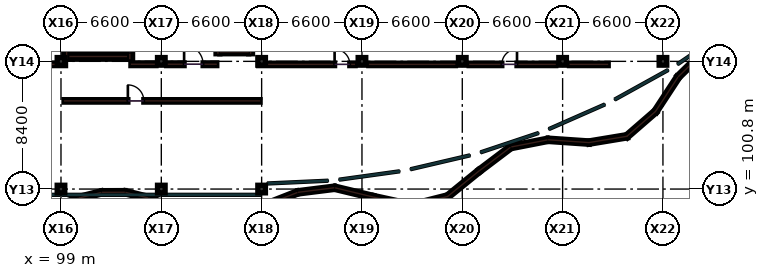
"""IFC4 building model, lengths in metres.
Left out: names, types, materials, properties, quantities, classifications, styles, units other than length and angle.
Written with IfcOpenShell. Run it as: python <this file> out.ifc"""

import sys

from ifc_helpers import new_model, si_unit, direction, frame, frame_2d, origin, origin_2d, place, context, subcontext, project, spatial, rectangle, extrude, element, fill, save


model = new_model("IFC4")
c1 = context("Model", 3, precision=1e-05, world=origin(), true_north=direction((0.0, 1.0)))
c2 = subcontext(c1, "Body", "Model", "MODEL_VIEW")
j1 = project(units=[si_unit("LENGTHUNIT", "METRE"), si_unit("PLANEANGLEUNIT", "RADIAN")], contexts=[c1])
p1 = place(None, origin())
s1 = spatial("IfcSite", under=j1, at=p1, CompositionType="ELEMENT")
p2 = place(p1, origin())
s2 = spatial("IfcBuilding", under=s1, at=p2, CompositionType="ELEMENT")
p3 = place(p2, frame((0.0, 0.0, 18.6)))
s3 = spatial("IfcBuildingStorey", under=s2, at=p3, CompositionType="ELEMENT", Elevation=18.6)
for number, where, z_axis, x_axis in (
    (1, (99.0, 100.8, 0.0), (0.0, 0.0, 1.0), (1.0, 0.0, 0.0)),
    (2, (99.0, 109.2, 0.0), (0.0, 0.0, 1.0), (1.0, 0.0, 0.0)),
    (3, (105.6, 100.8, 0.0), (0.0, 0.0, 1.0), (1.0, 0.0, 0.0)),
    (4, (105.6, 109.2, 0.0), (0.0, 0.0, 1.0), (1.0, 0.0, 0.0)),
    (5, (112.2, 100.8, 0.0), (0.0, 0.0, 1.0), (1.0, 0.0, 0.0)),
    (6, (112.2, 109.2, 0.0), (0.0, 0.0, 1.0), (1.0, 0.0, 0.0)),
    (7, (118.8, 109.2, 0.0), (0.0, 0.0, 1.0), (1.0, 0.0, 0.0)),
    (8, (125.4, 109.2, 0.0), (0.0, 0.0, 1.0), (1.0, 0.0, 0.0)),
    (9, (132.0, 109.2, 0.0), (0.0, 0.0, 1.0), (1.0, 0.0, 0.0)),
    (10, (138.6, 109.2, 0.0), (0.0, 0.0, 1.0), (1.0, 0.0, 0.0)),
):
    element("IfcColumn", number, at=place(p3, frame(where, z_axis=z_axis, x_axis=x_axis)), inside=s3, PredefinedType="COLUMN", context=c2, shape_type="SweptSolid", body=[
        extrude(rectangle(XDim=0.5, YDim=0.5, at=origin_2d()), origin(), (0.0, 0.0, 1.0), 4.2),
    ])
p4 = place(p3, frame((92.85, 109.0, 0.0), z_axis=(0.0, 0.0, 1.0), x_axis=(1.0, 0.0, 0.0)))
e11 = element("IfcWall", 11, at=p4, inside=s3, PredefinedType="PARTITIONING", context=c2, shape_type="SweptSolid", body=[
    extrude(rectangle(XDim=6.45, YDim=0.16, at=frame_2d((3.225, 0.0))), origin(), (0.0, 0.0, 1.0), 3.175),
])
p5 = place(p3, frame((112.0, 109.0, 0.0), z_axis=(0.0, 0.0, 1.0), x_axis=(1.0, 0.0, 0.0)))
e12 = element("IfcWall", 12, at=p5, inside=s3, PredefinedType="PARTITIONING", context=c2, shape_type="SweptSolid", body=[
    extrude(rectangle(XDim=6.35, YDim=0.16, at=frame_2d((3.175, 0.0))), origin(), (0.0, 0.0, 1.0), 3.175),
])
p6 = place(p5, frame((5.0, 0.0, 0.0)))
e13 = element("IfcOpeningElement", 13, at=p6, cuts=e12, PredefinedType="OPENING", context=c2, shape_type="SweptSolid", body=[
    extrude(rectangle(XDim=1.0, YDim=2.2, at=frame_2d((0.5, 1.1))), frame((0.0, 0.09, 0.0), z_axis=(0.0, -1.0, 0.0), x_axis=(1.0, 0.0, 0.0)), (0.0, 0.0, 1.0), 0.18),
])
p7 = place(p3, frame((119.25, 109.0, 0.0), z_axis=(0.0, 0.0, 1.0), x_axis=(1.0, 0.0, 0.0)))
e14 = element("IfcWall", 14, at=p7, inside=s3, PredefinedType="PARTITIONING", context=c2, shape_type="SweptSolid", body=[
    extrude(rectangle(XDim=5.7, YDim=0.16, at=frame_2d((2.85, 0.0))), origin(), (0.0, 0.0, 1.0), 3.175),
])
p8 = place(p3, frame((125.85, 109.0, 0.0), z_axis=(0.0, 0.0, 1.0), x_axis=(1.0, 0.0, 0.0)))
e15 = element("IfcWall", 15, at=p8, inside=s3, PredefinedType="PARTITIONING", context=c2, shape_type="SweptSolid", body=[
    extrude(rectangle(XDim=5.7, YDim=0.16, at=frame_2d((2.85, 0.0))), origin(), (0.0, 0.0, 1.0), 3.175),
])
p9 = place(p8, frame((2.15, 0.0, 0.0)))
e16 = element("IfcOpeningElement", 16, at=p9, cuts=e15, PredefinedType="OPENING", context=c2, shape_type="SweptSolid", body=[
    extrude(rectangle(XDim=1.0, YDim=2.2, at=frame_2d((0.5, 1.1))), frame((0.0, 0.09, 0.0), z_axis=(0.0, -1.0, 0.0), x_axis=(1.0, 0.0, 0.0)), (0.0, 0.0, 1.0), 0.18),
])
p10 = place(p3, frame((132.45, 109.0, 0.0), z_axis=(0.0, 0.0, 1.0), x_axis=(1.0, 0.0, 0.0)))
e17 = element("IfcWall", 17, at=p10, inside=s3, PredefinedType="PARTITIONING", context=c2, shape_type="SweptSolid", body=[
    extrude(rectangle(XDim=2.55, YDim=0.16, at=frame_2d((1.275, 0.0))), origin(), (0.0, 0.0, 1.0), 3.175),
])
p11 = place(p3, frame((99.2, 106.6, 0.0), z_axis=(0.0, 0.0, 1.0), x_axis=(1.0, 0.0, 0.0)))
e18 = element("IfcWall", 18, at=p11, inside=s3, PredefinedType="PARTITIONING", context=c2, shape_type="SweptSolid", body=[
    extrude(rectangle(XDim=12.9, YDim=0.16, at=frame_2d((6.45, 0.0))), origin(), (0.0, 0.0, 1.0), 3.19),
])
p12 = place(p11, frame((4.2, 0.0, 0.0)))
e19 = element("IfcOpeningElement", 19, at=p12, cuts=e18, PredefinedType="OPENING", context=c2, shape_type="SweptSolid", body=[
    extrude(rectangle(XDim=1.05, YDim=2.15, at=frame_2d((0.525, 1.075))), frame((0.0, 0.09, 0.0), z_axis=(0.0, -1.0, 0.0), x_axis=(1.0, 0.0, 0.0)), (0.0, 0.0, 1.0), 0.18),
])
p13 = place(p3, frame((98.65, 99.63, 0.0), z_axis=(0.0, 0.0, 1.0), x_axis=(0.934769434387, 0.355254985237, 0.0)))
e20 = element("IfcWall", 20, at=p13, inside=s3, PredefinedType="SOLIDWALL", context=c2, shape_type="SweptSolid", body=[
    extrude(rectangle(XDim=1.605, YDim=0.22, at=frame_2d((0.802, 0.0))), origin(), (0.0, 0.0, 1.0), 1.45),
])
p14 = place(p3, frame((100.165, 100.205, 0.0), z_axis=(0.0, 0.0, 1.0), x_axis=(0.970142500145, 0.242535625036, 0.0)))
e21 = element("IfcWall", 21, at=p14, inside=s3, PredefinedType="SOLIDWALL", context=c2, shape_type="SweptSolid", body=[
    extrude(rectangle(XDim=1.546, YDim=0.22, at=frame_2d((0.773, 0.0))), origin(), (0.0, 0.0, 1.0), 1.45),
])
p15 = place(p3, frame((101.7, 100.585, 0.0), z_axis=(0.0, 0.0, 1.0), x_axis=(0.999994158796, 0.003417948785, 0.0)))
e22 = element("IfcWall", 22, at=p15, inside=s3, PredefinedType="SOLIDWALL", context=c2, shape_type="SweptSolid", body=[
    extrude(rectangle(XDim=1.5, YDim=0.22, at=frame_2d((0.75, 0.0))), origin(), (0.0, 0.0, 1.0), 1.45),
])
p16 = place(p3, frame((103.235, 100.585, 0.0), z_axis=(0.0, 0.0, 1.0), x_axis=(0.970918311966, -0.239411009542, 0.0)))
e23 = element("IfcWall", 23, at=p16, inside=s3, PredefinedType="SOLIDWALL", context=c2, shape_type="SweptSolid", body=[
    extrude(rectangle(XDim=1.545, YDim=0.22, at=frame_2d((0.772, 0.0))), origin(), (0.0, 0.0, 1.0), 1.45),
])
p17 = place(p3, frame((104.75, 100.21, 0.0), z_axis=(0.0, 0.0, 1.0), x_axis=(0.933756275822, -0.35790951002, 0.0)))
e24 = element("IfcWall", 24, at=p17, inside=s3, PredefinedType="SOLIDWALL", context=c2, shape_type="SweptSolid", body=[
    extrude(rectangle(XDim=1.606, YDim=0.22, at=frame_2d((0.803, 0.0))), origin(), (0.0, 0.0, 1.0), 1.45),
])
p18 = place(p3, frame((112.15, 99.63, 0.0), z_axis=(0.0, 0.0, 1.0), x_axis=(0.930985139388, 0.365057078056, 0.0)))
e25 = element("IfcWall", 25, at=p18, inside=s3, PredefinedType="SOLIDWALL", context=c2, shape_type="SweptSolid", body=[
    extrude(rectangle(XDim=2.589, YDim=0.22, at=frame_2d((1.294, 0.0))), origin(), (0.0, 0.0, 1.0), 1.45),
])
p19 = place(p3, frame((114.595, 100.585, 0.0), z_axis=(0.0, 0.0, 1.0), x_axis=(0.992212250999, 0.124558616596, 0.0)))
e26 = element("IfcWall", 26, at=p19, inside=s3, PredefinedType="SOLIDWALL", context=c2, shape_type="SweptSolid", body=[
    extrude(rectangle(XDim=2.409, YDim=0.22, at=frame_2d((1.205, 0.0))), origin(), (0.0, 0.0, 1.0), 1.45),
])
p20 = place(p3, frame((117.035, 100.88, 0.0), z_axis=(0.0, 0.0, 1.0), x_axis=(0.972056124362, -0.234748569942, 0.0)))
e27 = element("IfcWall", 27, at=p20, inside=s3, PredefinedType="SOLIDWALL", context=c2, shape_type="SweptSolid", body=[
    extrude(rectangle(XDim=2.577, YDim=0.22, at=frame_2d((1.289, 0.0))), origin(), (0.0, 0.0, 1.0), 1.45),
])
p21 = place(p3, frame((119.535, 100.275, 0.0), z_axis=(0.0, 0.0, 1.0), x_axis=(0.977029011345, -0.213106337285, 0.0)))
e28 = element("IfcWall", 28, at=p21, inside=s3, PredefinedType="SOLIDWALL", context=c2, shape_type="SweptSolid", body=[
    extrude(rectangle(XDim=2.651, YDim=0.22, at=frame_2d((1.325, 0.0))), origin(), (0.0, 0.0, 1.0), 1.45),
])
p22 = place(p3, frame((122.06, 99.71, 0.0), z_axis=(0.0, 0.0, 1.0), x_axis=(0.969416078768, 0.245423035239, 0.0)))
e29 = element("IfcWall", 29, at=p22, inside=s3, PredefinedType="SOLIDWALL", context=c2, shape_type="SweptSolid", body=[
    extrude(rectangle(XDim=2.486, YDim=0.22, at=frame_2d((1.243, 0.0))), origin(), (0.0, 0.0, 1.0), 1.45),
])
p23 = place(p3, frame((124.415, 100.295, 0.0), z_axis=(0.0, 0.0, 1.0), x_axis=(0.776304461047, 0.630358139281, 0.0)))
e30 = element("IfcWall", 30, at=p23, inside=s3, PredefinedType="SOLIDWALL", context=c2, shape_type="SweptSolid", body=[
    extrude(rectangle(XDim=2.705, YDim=0.22, at=frame_2d((1.353, 0.0))), origin(), (0.0, 0.0, 1.0), 1.45),
])
p24 = place(p3, frame((126.52, 102.0, 0.0), z_axis=(0.0, 0.0, 1.0), x_axis=(0.797891759474, 0.602800746651, 0.0)))
e31 = element("IfcWall", 31, at=p24, inside=s3, PredefinedType="SOLIDWALL", context=c2, shape_type="SweptSolid", body=[
    extrude(rectangle(XDim=2.563, YDim=0.22, at=frame_2d((1.281, 0.0))), origin(), (0.0, 0.0, 1.0), 1.45),
])
p25 = place(p3, frame((128.625, 103.57, 0.0), z_axis=(0.0, 0.0, 1.0), x_axis=(0.981531105134, 0.191302612773, 0.0)))
e32 = element("IfcWall", 32, at=p25, inside=s3, PredefinedType="SOLIDWALL", context=c2, shape_type="SweptSolid", body=[
    extrude(rectangle(XDim=2.43, YDim=0.22, at=frame_2d((1.215, 0.0))), origin(), (0.0, 0.0, 1.0), 1.45),
])
p26 = place(p3, frame((131.045, 104.04, 0.0), z_axis=(0.0, 0.0, 1.0), x_axis=(0.997676478133, -0.068129618957, 0.0)))
e33 = element("IfcWall", 33, at=p26, inside=s3, PredefinedType="SOLIDWALL", context=c2, shape_type="SweptSolid", body=[
    extrude(rectangle(XDim=2.716, YDim=0.22, at=frame_2d((1.358, 0.0))), origin(), (0.0, 0.0, 1.0), 1.45),
])
p27 = place(p3, frame((133.72, 103.855, 0.0), z_axis=(0.0, 0.0, 1.0), x_axis=(0.98660836712, 0.163107111827, 0.0)))
e34 = element("IfcWall", 34, at=p27, inside=s3, PredefinedType="SOLIDWALL", context=c2, shape_type="SweptSolid", body=[
    extrude(rectangle(XDim=2.574, YDim=0.22, at=frame_2d((1.287, 0.0))), origin(), (0.0, 0.0, 1.0), 1.45),
])
p28 = place(p3, frame((136.195, 104.24, 0.0), z_axis=(0.0, 0.0, 1.0), x_axis=(0.755388714283, 0.655276956968, 0.0)))
e35 = element("IfcWall", 35, at=p28, inside=s3, PredefinedType="SOLIDWALL", context=c2, shape_type="SweptSolid", body=[
    extrude(rectangle(XDim=2.548, YDim=0.22, at=frame_2d((1.274, 0.0))), origin(), (0.0, 0.0, 1.0), 1.45),
])
p29 = place(p3, frame((138.095, 105.88, 0.0), z_axis=(0.0, 0.0, 1.0), x_axis=(0.548361068299, 0.836241674861, 0.0)))
e36 = element("IfcWall", 36, at=p29, inside=s3, PredefinedType="SOLIDWALL", context=c2, shape_type="SweptSolid", body=[
    extrude(rectangle(XDim=2.727, YDim=0.22, at=frame_2d((1.363, 0.0))), origin(), (0.0, 0.0, 1.0), 1.45),
])
p30 = place(p3, frame((139.605, 108.185, 0.0), z_axis=(0.0, 0.0, 1.0), x_axis=(0.715267450617, 0.698850823916, 0.0)))
e37 = element("IfcWall", 37, at=p30, inside=s3, PredefinedType="SOLIDWALL", context=c2, shape_type="SweptSolid", body=[
    extrude(rectangle(XDim=2.454, YDim=0.22, at=frame_2d((1.227, 0.0))), origin(), (0.0, 0.0, 1.0), 1.45),
])
p31 = place(p3, frame((99.37, 109.34, 0.0), z_axis=(0.0, 0.0, 1.0), x_axis=(0.0, 1.0, 0.0)))
e38 = element("IfcWall", 38, at=p31, inside=s3, PredefinedType="SHEAR", context=c2, shape_type="SweptSolid", body=[
    extrude(rectangle(XDim=8.09, YDim=0.36, at=frame_2d((4.045, 0.0))), origin(), (0.0, 0.0, 1.0), 3.94),
])
p32 = place(p3, frame((103.53, 109.34, 0.0), z_axis=(0.0, 0.0, 1.0), x_axis=(0.0, 1.0, 0.0)))
e39 = element("IfcWall", 39, at=p32, inside=s3, PredefinedType="SHEAR", context=c2, shape_type="SweptSolid", body=[
    extrude(rectangle(XDim=8.09, YDim=0.36, at=frame_2d((4.045, 0.0))), origin(), (0.0, 0.0, 1.0), 3.94),
])
p33 = place(p32, frame((0.45, 0.0, 0.0)))
e40 = element("IfcOpeningElement", 40, at=p33, cuts=e39, PredefinedType="OPENING", context=c2, shape_type="SweptSolid", body=[
    extrude(rectangle(XDim=1.25, YDim=2.15, at=frame_2d((0.625, 1.075))), frame((0.0, 0.19, 0.0), z_axis=(0.0, -1.0, 0.0), x_axis=(1.0, 0.0, 0.0)), (0.0, 0.0, 1.0), 0.38),
])
p34 = place(p3, frame((99.55, 109.52, 0.0), z_axis=(0.0, 0.0, 1.0), x_axis=(1.0, 0.0, 0.0)))
e41 = element("IfcWall", 41, at=p34, inside=s3, PredefinedType="SHEAR", context=c2, shape_type="SweptSolid", body=[
    extrude(rectangle(XDim=3.8, YDim=0.36, at=frame_2d((1.9, 0.0))), origin(), (0.0, 0.0, 1.0), 3.94),
])
p35 = place(p3, frame((109.325, 109.7, 0.0), z_axis=(0.0, 0.0, 1.0), x_axis=(0.0, 1.0, 0.0)))
e42 = element("IfcWall", 42, at=p35, inside=s3, PredefinedType="SHEAR", context=c2, shape_type="SweptSolid", body=[
    extrude(rectangle(XDim=3.2, YDim=0.25, at=frame_2d((1.6, 0.0))), origin(), (0.0, 0.0, 1.0), 3.94),
])
p36 = place(p35, frame((1.05, 0.0, 0.0)))
e43 = element("IfcOpeningElement", 43, at=p36, cuts=e42, PredefinedType="OPENING", context=c2, shape_type="SweptSolid", body=[
    extrude(rectangle(XDim=1.1, YDim=2.15, at=frame_2d((0.55, 1.075))), frame((0.0, 0.135, 0.0), z_axis=(0.0, -1.0, 0.0), x_axis=(1.0, 0.0, 0.0)), (0.0, 0.0, 1.0), 0.27),
])
p37 = place(p3, frame((111.475, 109.7, 0.0), z_axis=(0.0, 0.0, 1.0), x_axis=(0.0, 1.0, 0.0)))
e44 = element("IfcWall", 44, at=p37, inside=s3, PredefinedType="SHEAR", context=c2, shape_type="SweptSolid", body=[
    extrude(rectangle(XDim=3.2, YDim=0.25, at=frame_2d((1.6, 0.0))), origin(), (0.0, 0.0, 1.0), 3.94),
])
p38 = place(p3, frame((109.45, 109.825, 0.0), z_axis=(0.0, 0.0, 1.0), x_axis=(1.0, 0.0, 0.0)))
e45 = element("IfcWall", 45, at=p38, inside=s3, PredefinedType="SHEAR", context=c2, shape_type="SweptSolid", body=[
    extrude(rectangle(XDim=1.9, YDim=0.25, at=frame_2d((0.95, 0.0))), origin(), (0.0, 0.0, 1.0), 3.94),
])
p39 = place(p3, frame((103.6, 109.01, 0.0), z_axis=(0.0, 0.0, 1.0), x_axis=(1.0, 0.0, 0.0)))
e46 = element("IfcWall", 46, at=p39, inside=s3, PredefinedType="SOLIDWALL", context=c2, shape_type="SweptSolid", body=[
    extrude(rectangle(XDim=1.65, YDim=0.18, at=frame_2d((0.825, 0.0))), origin(), (0.0, 0.0, 1.0), 3.175),
])
p40 = place(p3, frame((105.95, 109.01, 0.0), z_axis=(0.0, 0.0, 1.0), x_axis=(1.0, 0.0, 0.0)))
e47 = element("IfcWall", 47, at=p40, inside=s3, PredefinedType="SOLIDWALL", context=c2, shape_type="SweptSolid", body=[
    extrude(rectangle(XDim=3.3, YDim=0.18, at=frame_2d((1.65, 0.0))), origin(), (0.0, 0.0, 1.0), 3.175),
])
p41 = place(p40, frame((1.15, 0.0, 0.0)))
e48 = element("IfcOpeningElement", 48, at=p41, cuts=e47, PredefinedType="OPENING", context=c2, shape_type="SweptSolid", body=[
    extrude(rectangle(XDim=1.25, YDim=2.15, at=frame_2d((0.625, 1.075))), frame((0.0, 0.1, 0.0), z_axis=(0.0, -1.0, 0.0), x_axis=(1.0, 0.0, 0.0)), (0.0, 0.0, 1.0), 0.2),
])
p42 = place(p6, origin())
e49 = element("IfcDoor", 49, at=p42, inside=s3, OperationType="SINGLE_SWING_LEFT", PredefinedType="DOOR", context=c2, shape_type="SweptSolid", body=[
    extrude(rectangle(XDim=1.0, YDim=2.2, at=frame_2d((0.5, 1.1))), frame((0.0, 0.025, 0.0), z_axis=(0.0, -1.0, 0.0), x_axis=(1.0, 0.0, 0.0)), (0.0, 0.0, 1.0), 0.05),
])
fill(e13, e49)
p43 = place(p9, origin())
e50 = element("IfcDoor", 50, at=p43, inside=s3, OperationType="SINGLE_SWING_RIGHT", PredefinedType="DOOR", context=c2, shape_type="SweptSolid", body=[
    extrude(rectangle(XDim=1.0, YDim=2.2, at=frame_2d((0.5, 1.1))), frame((0.0, 0.025, 0.0), z_axis=(0.0, -1.0, 0.0), x_axis=(1.0, 0.0, 0.0)), (0.0, 0.0, 1.0), 0.05),
])
fill(e16, e50)
p44 = place(p12, origin())
e51 = element("IfcDoor", 51, at=p44, inside=s3, OperationType="SINGLE_SWING_LEFT", PredefinedType="DOOR", context=c2, shape_type="SweptSolid", body=[
    extrude(rectangle(XDim=1.05, YDim=2.15, at=frame_2d((0.525, 1.075))), frame((0.0, 0.025, 0.0), z_axis=(0.0, -1.0, 0.0), x_axis=(1.0, 0.0, 0.0)), (0.0, 0.0, 1.0), 0.05),
])
fill(e19, e51)
p45 = place(p33, origin())
e52 = element("IfcDoor", 52, at=p45, inside=s3, OperationType="SINGLE_SWING_RIGHT", PredefinedType="DOOR", context=c2, shape_type="SweptSolid", body=[
    extrude(rectangle(XDim=1.25, YDim=2.15, at=frame_2d((0.625, 1.075))), frame((0.0, 0.025, 0.0), z_axis=(0.0, -1.0, 0.0), x_axis=(1.0, 0.0, 0.0)), (0.0, 0.0, 1.0), 0.05),
])
fill(e40, e52)
p46 = place(p41, origin())
e53 = element("IfcDoor", 53, at=p46, inside=s3, OperationType="SINGLE_SWING_LEFT", PredefinedType="DOOR", context=c2, shape_type="SweptSolid", body=[
    extrude(rectangle(XDim=1.25, YDim=2.15, at=frame_2d((0.625, 1.075))), frame((0.0, 0.025, 0.0), z_axis=(0.0, -1.0, 0.0), x_axis=(1.0, 0.0, 0.0)), (0.0, 0.0, 1.0), 0.05),
])
fill(e48, e53)
save(model, sys.argv[1])
